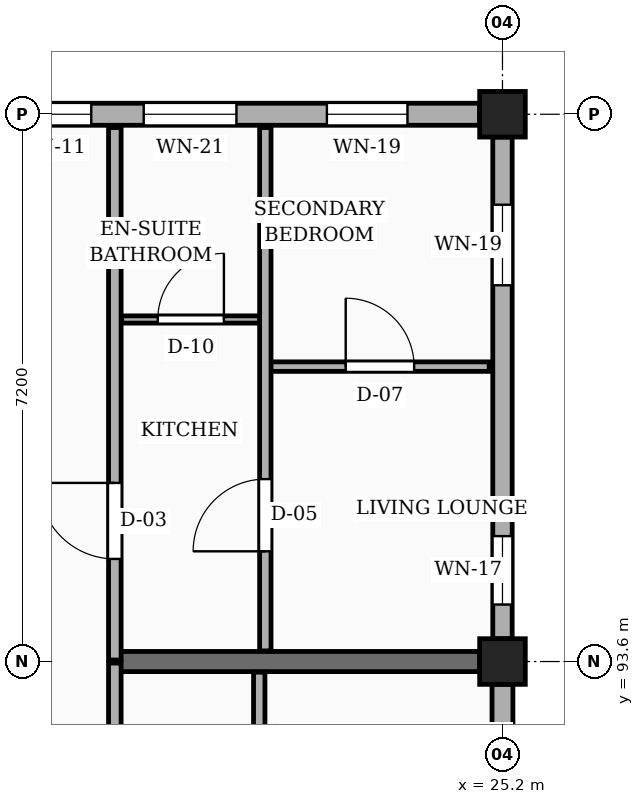
"""IFC4 building model, lengths in metres.
Left out: names, types, materials, properties, quantities, classifications, styles, units other than length and angle.
Written with IfcOpenShell. Run it as: python <this file> out.ifc"""

import sys

from ifc_helpers import new_model, si_unit, direction, frame, frame_2d, origin, origin_2d, place, context, subcontext, project, spatial, rectangle, extrude, element, fill, save


model = new_model("IFC4")
c1 = context("Model", 3, precision=1e-05, world=origin(), true_north=direction((0.0, 1.0)))
c2 = subcontext(c1, "Body", "Model", "MODEL_VIEW")
j1 = project(units=[si_unit("LENGTHUNIT", "METRE"), si_unit("PLANEANGLEUNIT", "RADIAN")], contexts=[c1])
p1 = place(None, origin())
s1 = spatial("IfcSite", under=j1, at=p1, CompositionType="ELEMENT")
p2 = place(p1, origin())
s2 = spatial("IfcBuilding", under=s1, at=p2, CompositionType="ELEMENT")
p3 = place(p2, frame((0.0, 0.0, 4.5)))
s3 = spatial("IfcBuildingStorey", under=s2, at=p3, CompositionType="ELEMENT", Elevation=4.5)
for number, where, z_axis, x_axis in (
    (1, (25.2, 93.6, 0.0), (0.0, 0.0, 1.0), (1.0, 0.0, 0.0)),
    (2, (25.2, 100.8, 0.0), (0.0, 0.0, 1.0), (1.0, 0.0, 0.0)),
):
    element("IfcColumn", number, at=place(p3, frame(where, z_axis=z_axis, x_axis=x_axis)), inside=s3, PredefinedType="COLUMN", context=c2, shape_type="SweptSolid", body=[
        extrude(rectangle(XDim=0.6, YDim=0.6, at=origin_2d()), origin(), (0.0, 0.0, 1.0), 3.15),
    ])
p4 = place(p3, frame((20.1, 93.6, 0.0), z_axis=(0.0, 0.0, 1.0), x_axis=(1.0, 0.0, 0.0)))
e3 = element("IfcWall", 3, at=p4, inside=s3, PredefinedType="SOLIDWALL", context=c2, shape_type="SweptSolid", body=[
    extrude(rectangle(XDim=4.8, YDim=0.265, at=frame_2d((2.4, 0.0))), origin(), (0.0, 0.0, 1.0), 2.21),
])
p5 = place(p3, frame((25.2, 86.7, 0.0), z_axis=(0.0, 0.0, 1.0), x_axis=(0.0, 1.0, 0.0)))
e4 = element("IfcWall", 4, at=p5, inside=s3, PredefinedType="SOLIDWALL", context=c2, shape_type="SweptSolid", body=[
    extrude(rectangle(XDim=6.6, YDim=0.275, at=frame_2d((3.3, 0.0))), origin(), (0.0, 0.0, 1.0), 2.48),
])
p6 = place(p5, frame((0.45, 0.0, 0.78)))
e5 = element("IfcOpeningElement", 5, at=p6, cuts=e4, PredefinedType="OPENING", context=c2, shape_type="SweptSolid", body=[
    extrude(rectangle(XDim=1.36, YDim=1.26, at=frame_2d((0.68, 0.63))), frame((0.0, 0.147, 0.0), z_axis=(0.0, -1.0, 0.0), x_axis=(1.0, 0.0, 0.0)), (0.0, 0.0, 1.0), 0.295),
])
p7 = place(p5, frame((4.65, 0.0, 0.78)))
e6 = element("IfcOpeningElement", 6, at=p7, cuts=e4, PredefinedType="OPENING", context=c2, shape_type="SweptSolid", body=[
    extrude(rectangle(XDim=0.9, YDim=1.36, at=frame_2d((0.45, 0.68))), frame((0.0, 0.147, 0.0), z_axis=(0.0, -1.0, 0.0), x_axis=(1.0, 0.0, 0.0)), (0.0, 0.0, 1.0), 0.295),
])
p8 = place(p3, frame((25.2, 93.9, 0.0), z_axis=(0.0, 0.0, 1.0), x_axis=(0.0, 1.0, 0.0)))
e7 = element("IfcWall", 7, at=p8, inside=s3, PredefinedType="SOLIDWALL", context=c2, shape_type="SweptSolid", body=[
    extrude(rectangle(XDim=6.6, YDim=0.255, at=frame_2d((3.3, 0.0))), origin(), (0.0, 0.0, 1.0), 2.48),
])
p9 = place(p8, frame((0.45, 0.0, 0.78)))
e8 = element("IfcOpeningElement", 8, at=p9, cuts=e7, PredefinedType="OPENING", context=c2, shape_type="SweptSolid", body=[
    extrude(rectangle(XDim=0.9, YDim=1.36, at=frame_2d((0.45, 0.68))), frame((0.0, 0.137, 0.0), z_axis=(0.0, -1.0, 0.0), x_axis=(1.0, 0.0, 0.0)), (0.0, 0.0, 1.0), 0.275),
])
p10 = place(p8, frame((4.65, 0.0, 0.78)))
e9 = element("IfcOpeningElement", 9, at=p10, cuts=e7, PredefinedType="OPENING", context=c2, shape_type="SweptSolid", body=[
    extrude(rectangle(XDim=1.06, YDim=1.36, at=frame_2d((0.53, 0.68))), frame((0.0, 0.137, 0.0), z_axis=(0.0, -1.0, 0.0), x_axis=(1.0, 0.0, 0.0)), (0.0, 0.0, 1.0), 0.275),
])
p11 = place(p3, frame((24.9, 100.8, 0.0), z_axis=(0.0, 0.0, 1.0), x_axis=(-1.0, 0.0, 0.0)))
e10 = element("IfcWall", 10, at=p11, inside=s3, PredefinedType="SOLIDWALL", context=c2, shape_type="SweptSolid", body=[
    extrude(rectangle(XDim=6.6, YDim=0.29, at=frame_2d((3.3, 0.0))), origin(), (0.0, 0.0, 1.0), 2.48),
])
p12 = place(p11, frame((0.95, 0.0, 0.78)))
e11 = element("IfcOpeningElement", 11, at=p12, cuts=e10, PredefinedType="OPENING", context=c2, shape_type="SweptSolid", body=[
    extrude(rectangle(XDim=1.06, YDim=1.36, at=frame_2d((0.53, 0.68))), frame((0.0, 0.155, 0.0), z_axis=(0.0, -1.0, 0.0), x_axis=(1.0, 0.0, 0.0)), (0.0, 0.0, 1.0), 0.31),
])
p13 = place(p11, frame((3.2, 0.0, 0.78)))
e12 = element("IfcOpeningElement", 12, at=p13, cuts=e10, PredefinedType="OPENING", context=c2, shape_type="SweptSolid", body=[
    extrude(rectangle(XDim=1.22, YDim=1.36, at=frame_2d((0.61, 0.68))), frame((0.0, 0.155, 0.0), z_axis=(0.0, -1.0, 0.0), x_axis=(1.0, 0.0, 0.0)), (0.0, 0.0, 1.0), 0.31),
])
p14 = place(p11, frame((5.11, 0.0, 0.78)))
e13 = element("IfcOpeningElement", 13, at=p14, cuts=e10, PredefinedType="OPENING", context=c2, shape_type="SweptSolid", body=[
    extrude(rectangle(XDim=1.04, YDim=1.26, at=frame_2d((0.52, 0.63))), frame((0.0, 0.155, 0.0), z_axis=(0.0, -1.0, 0.0), x_axis=(1.0, 0.0, 0.0)), (0.0, 0.0, 1.0), 0.31),
])
p15 = place(p3, frame((20.1, 86.42, 0.0), z_axis=(0.0, 0.0, 1.0), x_axis=(0.0, 1.0, 0.0)))
e14 = element("IfcWall", 14, at=p15, inside=s3, PredefinedType="PARTITIONING", context=c2, shape_type="SweptSolid", body=[
    extrude(rectangle(XDim=7.16, YDim=0.165, at=frame_2d((3.58, 0.0))), origin(), (0.0, 0.0, 1.0), 2.345),
])
p16 = place(p15, frame((4.78, 0.0, 0.0)))
e15 = element("IfcOpeningElement", 15, at=p16, cuts=e14, PredefinedType="OPENING", context=c2, shape_type="SweptSolid", body=[
    extrude(rectangle(XDim=1.14, YDim=2.18, at=frame_2d((0.57, 1.09))), frame((0.0, 0.093, 0.0), z_axis=(0.0, -1.0, 0.0), x_axis=(1.0, 0.0, 0.0)), (0.0, 0.0, 1.0), 0.185),
])
p17 = place(p3, frame((20.1, 93.62, 0.0), z_axis=(0.0, 0.0, 1.0), x_axis=(0.0, 1.0, 0.0)))
e16 = element("IfcWall", 16, at=p17, inside=s3, PredefinedType="PARTITIONING", context=c2, shape_type="SweptSolid", body=[
    extrude(rectangle(XDim=7.005, YDim=0.165, at=frame_2d((3.502, 0.0))), origin(), (0.0, 0.0, 1.0), 2.345),
])
p18 = place(p17, frame((1.33, 0.0, 0.0)))
e17 = element("IfcOpeningElement", 17, at=p18, cuts=e16, PredefinedType="OPENING", context=c2, shape_type="SweptSolid", body=[
    extrude(rectangle(XDim=1.0, YDim=2.15, at=frame_2d((0.5, 1.075))), frame((0.0, 0.093, 0.0), z_axis=(0.0, -1.0, 0.0), x_axis=(1.0, 0.0, 0.0)), (0.0, 0.0, 1.0), 0.185),
])
p19 = place(p3, frame((22.0, 86.54, 0.0), z_axis=(0.0, 0.0, 1.0), x_axis=(0.0, 1.0, 0.0)))
e18 = element("IfcWall", 18, at=p19, inside=s3, PredefinedType="PARTITIONING", context=c2, shape_type="SweptSolid", body=[
    extrude(rectangle(XDim=6.92, YDim=0.15, at=frame_2d((3.46, 0.0))), origin(), (0.0, 0.0, 1.0), 2.345),
])
p20 = place(p19, frame((4.66, 0.0, 0.0)))
e19 = element("IfcOpeningElement", 19, at=p20, cuts=e18, PredefinedType="OPENING", context=c2, shape_type="SweptSolid", body=[
    extrude(rectangle(XDim=0.92, YDim=2.1, at=frame_2d((0.46, 1.05))), frame((0.0, 0.085, 0.0), z_axis=(0.0, -1.0, 0.0), x_axis=(1.0, 0.0, 0.0)), (0.0, 0.0, 1.0), 0.17),
])
p21 = place(p3, frame((22.15, 97.48, 0.0), z_axis=(0.0, 0.0, 1.0), x_axis=(1.0, 0.0, 0.0)))
e20 = element("IfcWall", 20, at=p21, inside=s3, PredefinedType="PARTITIONING", context=c2, shape_type="SweptSolid", body=[
    extrude(rectangle(XDim=2.875, YDim=0.125, at=frame_2d((1.438, 0.0))), origin(), (0.0, 0.0, 1.0), 2.345),
])
p22 = place(p21, frame((0.988, 0.0, 0.0)))
e21 = element("IfcOpeningElement", 21, at=p22, cuts=e20, PredefinedType="OPENING", context=c2, shape_type="SweptSolid", body=[
    extrude(rectangle(XDim=0.9, YDim=2.1, at=frame_2d((0.45, 1.05))), frame((0.0, 0.073, 0.0), z_axis=(0.0, -1.0, 0.0), x_axis=(1.0, 0.0, 0.0)), (0.0, 0.0, 1.0), 0.145),
])
p23 = place(p3, frame((20.19, 98.1, 0.0), z_axis=(0.0, 0.0, 1.0), x_axis=(1.0, 0.0, 0.0)))
e22 = element("IfcWall", 22, at=p23, inside=s3, PredefinedType="PARTITIONING", context=c2, shape_type="SweptSolid", body=[
    extrude(rectangle(XDim=1.82, YDim=0.095, at=frame_2d((0.91, 0.0))), origin(), (0.0, 0.0, 1.0), 2.345),
])
p24 = place(p23, frame((0.475, 0.0, 0.0)))
e23 = element("IfcOpeningElement", 23, at=p24, cuts=e22, PredefinedType="OPENING", context=c2, shape_type="SweptSolid", body=[
    extrude(rectangle(XDim=0.87, YDim=2.05, at=frame_2d((0.435, 1.025))), frame((0.0, 0.058, 0.0), z_axis=(0.0, -1.0, 0.0), x_axis=(1.0, 0.0, 0.0)), (0.0, 0.0, 1.0), 0.115),
])
p25 = place(p3, frame((22.08, 93.74, 0.0), z_axis=(0.0, 0.0, 1.0), x_axis=(0.0, 1.0, 0.0)))
e24 = element("IfcWall", 24, at=p25, inside=s3, PredefinedType="PARTITIONING", context=c2, shape_type="SweptSolid", body=[
    extrude(rectangle(XDim=6.885, YDim=0.15, at=frame_2d((3.442, 0.0))), origin(), (0.0, 0.0, 1.0), 2.345),
])
p26 = place(p25, frame((1.31, 0.0, 0.0)))
e25 = element("IfcOpeningElement", 25, at=p26, cuts=e24, PredefinedType="OPENING", context=c2, shape_type="SweptSolid", body=[
    extrude(rectangle(XDim=0.95, YDim=2.1, at=frame_2d((0.475, 1.05))), frame((0.0, 0.085, 0.0), z_axis=(0.0, -1.0, 0.0), x_axis=(1.0, 0.0, 0.0)), (0.0, 0.0, 1.0), 0.17),
])
p27 = place(p9, origin())
e26 = element("IfcWindow", 26, at=p27, inside=s3, PartitioningType="SINGLE_PANEL", PredefinedType="WINDOW", context=c2, shape_type="SweptSolid", body=[
    extrude(rectangle(XDim=0.9, YDim=1.36, at=frame_2d((0.45, 0.68))), frame((0.0, 0.03, 0.0), z_axis=(0.0, -1.0, 0.0), x_axis=(1.0, 0.0, 0.0)), (0.0, 0.0, 1.0), 0.06),
])
fill(e8, e26)
p28 = place(p10, origin())
e27 = element("IfcWindow", 27, at=p28, inside=s3, PartitioningType="SINGLE_PANEL", PredefinedType="WINDOW", context=c2, shape_type="SweptSolid", body=[
    extrude(rectangle(XDim=1.06, YDim=1.36, at=frame_2d((0.53, 0.68))), frame((0.0, 0.03, 0.0), z_axis=(0.0, -1.0, 0.0), x_axis=(1.0, 0.0, 0.0)), (0.0, 0.0, 1.0), 0.06),
])
fill(e9, e27)
p29 = place(p12, origin())
e28 = element("IfcWindow", 28, at=p29, inside=s3, PartitioningType="SINGLE_PANEL", PredefinedType="WINDOW", context=c2, shape_type="SweptSolid", body=[
    extrude(rectangle(XDim=1.06, YDim=1.36, at=frame_2d((0.53, 0.68))), frame((0.0, 0.03, 0.0), z_axis=(0.0, -1.0, 0.0), x_axis=(1.0, 0.0, 0.0)), (0.0, 0.0, 1.0), 0.06),
])
fill(e11, e28)
p30 = place(p13, origin())
e29 = element("IfcWindow", 29, at=p30, inside=s3, PartitioningType="SINGLE_PANEL", PredefinedType="WINDOW", context=c2, shape_type="SweptSolid", body=[
    extrude(rectangle(XDim=1.22, YDim=1.36, at=frame_2d((0.61, 0.68))), frame((0.0, 0.03, 0.0), z_axis=(0.0, -1.0, 0.0), x_axis=(1.0, 0.0, 0.0)), (0.0, 0.0, 1.0), 0.06),
])
fill(e12, e29)
p31 = place(p14, origin())
e30 = element("IfcWindow", 30, at=p31, inside=s3, PartitioningType="SINGLE_PANEL", PredefinedType="WINDOW", context=c2, shape_type="SweptSolid", body=[
    extrude(rectangle(XDim=1.04, YDim=1.26, at=frame_2d((0.52, 0.63))), frame((0.0, 0.03, 0.0), z_axis=(0.0, -1.0, 0.0), x_axis=(1.0, 0.0, 0.0)), (0.0, 0.0, 1.0), 0.06),
])
fill(e13, e30)
p32 = place(p18, origin())
e31 = element("IfcDoor", 31, at=p32, inside=s3, OperationType="SINGLE_SWING_RIGHT", PredefinedType="DOOR", context=c2, shape_type="SweptSolid", body=[
    extrude(rectangle(XDim=1.0, YDim=2.15, at=frame_2d((0.5, 1.075))), frame((0.0, 0.025, 0.0), z_axis=(0.0, -1.0, 0.0), x_axis=(1.0, 0.0, 0.0)), (0.0, 0.0, 1.0), 0.05),
])
fill(e17, e31)
p33 = place(p22, origin())
e32 = element("IfcDoor", 32, at=p33, inside=s3, OperationType="SINGLE_SWING_LEFT", PredefinedType="DOOR", context=c2, shape_type="SweptSolid", body=[
    extrude(rectangle(XDim=0.9, YDim=2.1, at=frame_2d((0.45, 1.05))), frame((0.0, 0.025, 0.0), z_axis=(0.0, -1.0, 0.0), x_axis=(1.0, 0.0, 0.0)), (0.0, 0.0, 1.0), 0.05),
])
fill(e21, e32)
p34 = place(p24, origin())
e33 = element("IfcDoor", 33, at=p34, inside=s3, OperationType="SINGLE_SWING_RIGHT", PredefinedType="DOOR", context=c2, shape_type="SweptSolid", body=[
    extrude(rectangle(XDim=0.87, YDim=2.05, at=frame_2d((0.435, 1.025))), frame((0.0, 0.025, 0.0), z_axis=(0.0, -1.0, 0.0), x_axis=(1.0, 0.0, 0.0)), (0.0, 0.0, 1.0), 0.05),
])
fill(e23, e33)
p35 = place(p26, origin())
e34 = element("IfcDoor", 34, at=p35, inside=s3, OperationType="SINGLE_SWING_LEFT", PredefinedType="DOOR", context=c2, shape_type="SweptSolid", body=[
    extrude(rectangle(XDim=0.95, YDim=2.1, at=frame_2d((0.475, 1.05))), frame((0.0, 0.025, 0.0), z_axis=(0.0, -1.0, 0.0), x_axis=(1.0, 0.0, 0.0)), (0.0, 0.0, 1.0), 0.05),
])
fill(e25, e34)
save(model, sys.argv[1])
